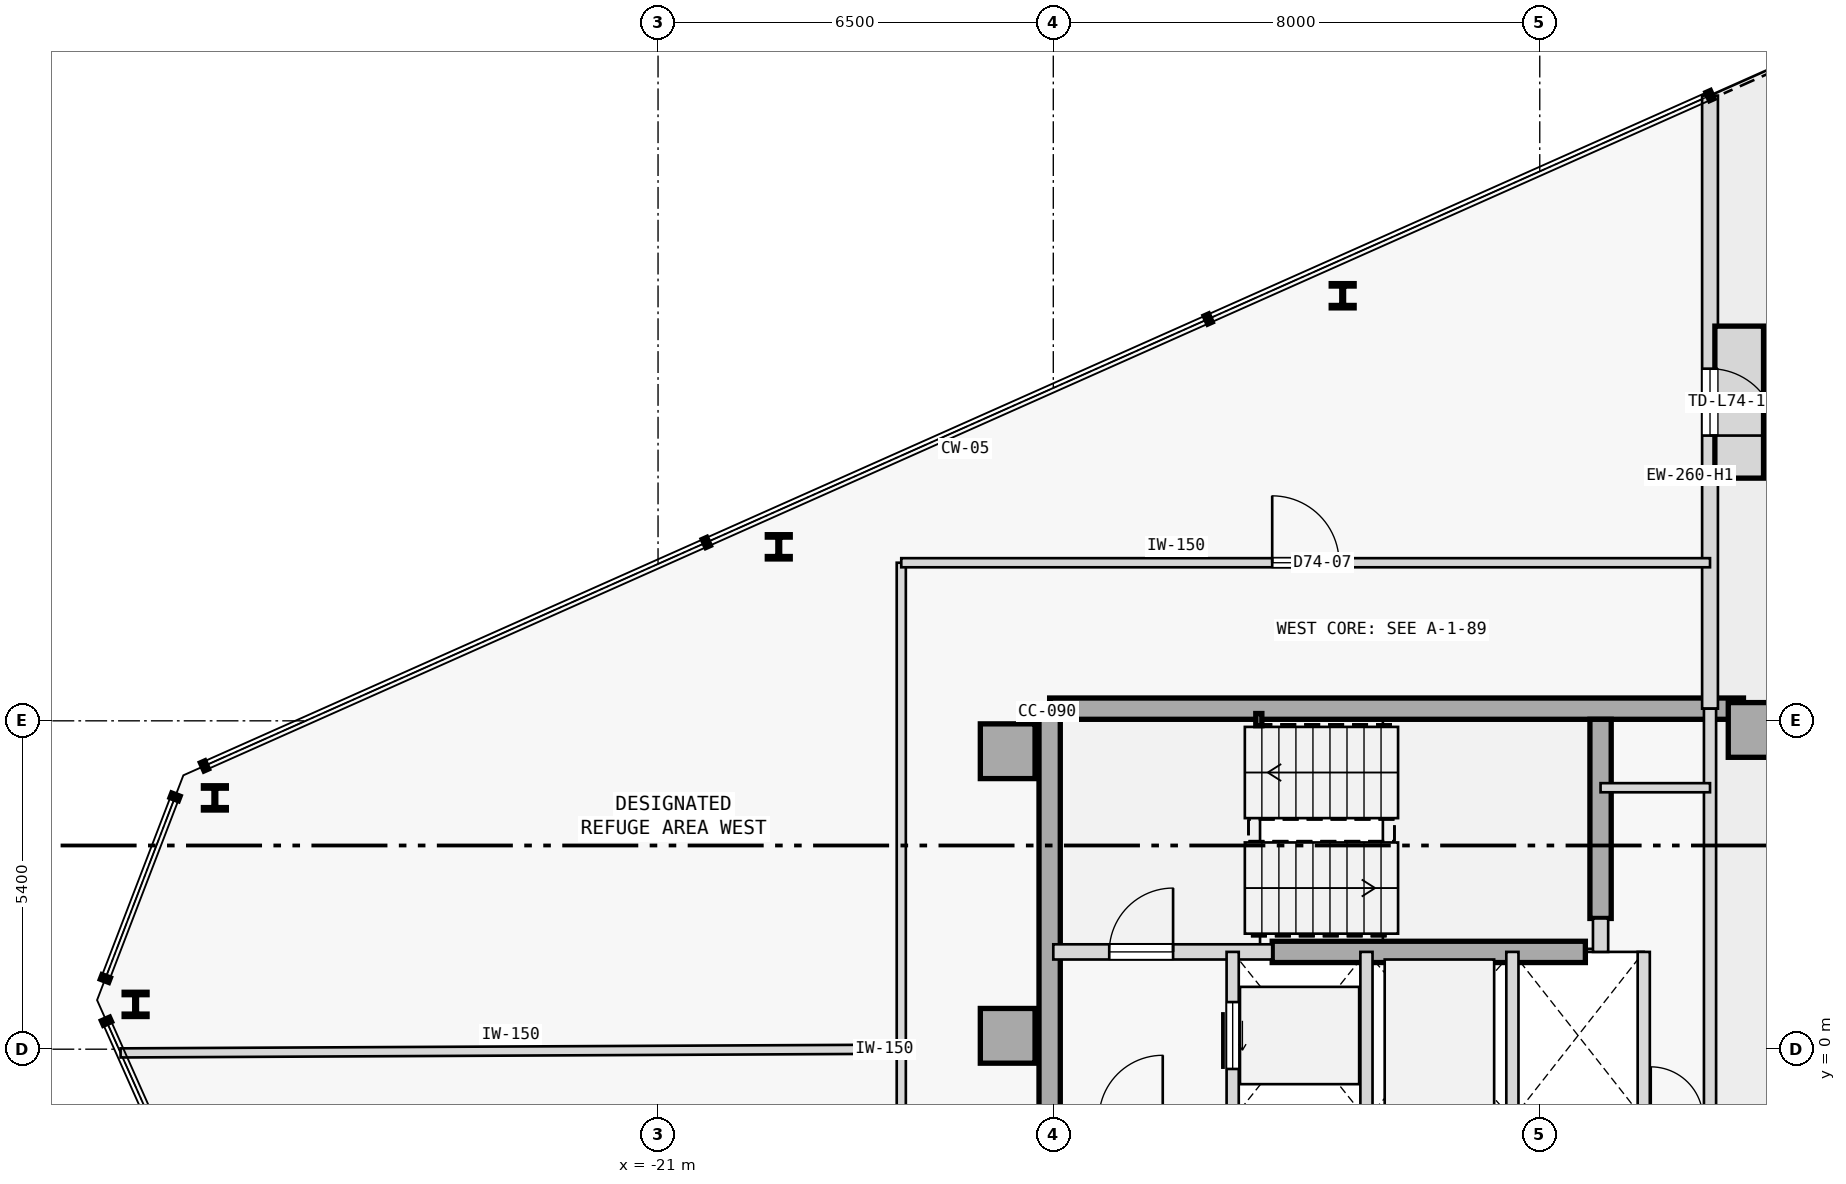
"""IFC4 building model, lengths in metres.
Left out: names, types, materials, properties, quantities, classifications, styles, units other than length and angle.
Written with IfcOpenShell. Run it as: python <this file> out.ifc"""

import sys

from ifc_helpers import new_model, si_unit, direction, frame, frame_2d, origin, origin_2d, place, context, subcontext, project, spatial, rectangle, hollow_rectangle, i_section, extrude, element, fill, save


model = new_model("IFC4")
c1 = context("Model", 3, precision=1e-05, world=origin(), true_north=direction((0.0, 1.0)))
c2 = subcontext(c1, "Body", "Model", "MODEL_VIEW")
j1 = project(units=[si_unit("LENGTHUNIT", "METRE"), si_unit("PLANEANGLEUNIT", "RADIAN")], contexts=[c1])
p1 = place(None, origin())
s1 = spatial("IfcSite", under=j1, at=p1, CompositionType="ELEMENT")
p2 = place(p1, origin())
s2 = spatial("IfcBuilding", under=s1, at=p2, CompositionType="ELEMENT")
p3 = place(p2, frame((0.0, 0.0, 275.6)))
s3 = spatial("IfcBuildingStorey", under=s2, at=p3, CompositionType="ELEMENT", Elevation=275.6)
for number, where, z_axis, x_axis in (
    (1, (-15.25, 4.9, 0.0), (0.0, 0.0, 1.0), (1.0, 0.0, 0.0)),
    (2, (-15.25, 0.22, 0.0), (0.0, 0.0, 1.0), (1.0, 0.0, 0.0)),
    (3, (-2.95, 5.25, 0.0), (0.0, 0.0, 1.0), (1.0, 0.0, 0.0)),
):
    element("IfcColumn", number, at=place(p3, frame(where, z_axis=z_axis, x_axis=x_axis)), inside=s3, PredefinedType="COLUMN", context=c2, shape_type="SweptSolid", body=[
        extrude(rectangle(XDim=0.9, YDim=0.9, at=origin_2d()), origin(), (0.0, 0.0, 1.0), 6.3),
    ])
p4 = place(p3, frame((-14.56, 5.6, 0.0), z_axis=(0.0, 0.0, 1.0), x_axis=(1.0, 0.0, 0.0)))
e4 = element("IfcWall", 4, at=p4, inside=s3, PredefinedType="SHEAR", context=c2, shape_type="SweptSolid", body=[
    extrude(rectangle(XDim=11.41, YDim=0.35, at=frame_2d((5.705, 0.0))), origin(), (0.0, 0.0, 1.0), 6.075),
])
p5 = place(p3, frame((-14.56, -5.425, 0.0), z_axis=(0.0, 0.0, 1.0), x_axis=(0.0, 1.0, 0.0)))
e5 = element("IfcWall", 5, at=p5, inside=s3, PredefinedType="SHEAR", context=c2, shape_type="SweptSolid", body=[
    extrude(rectangle(XDim=10.85, YDim=0.35, at=frame_2d((5.425, 0.0))), origin(), (0.0, 0.0, 1.0), 6.075),
])
p6 = place(p5, frame((2.825, 0.0, 0.0)))
e6 = element("IfcOpeningElement", 6, at=p6, cuts=e5, PredefinedType="OPENING", context=c2, shape_type="SweptSolid", body=[
    extrude(rectangle(XDim=1.05, YDim=2.15, at=frame_2d((0.525, 1.075))), frame((0.0, 0.185, 0.0), z_axis=(0.0, -1.0, 0.0), x_axis=(1.0, 0.0, 0.0)), (0.0, 0.0, 1.0), 0.37),
])
p7 = place(p3, frame((-5.5, 2.15, 0.0), z_axis=(0.0, 0.0, 1.0), x_axis=(0.0, 1.0, 0.0)))
e7 = element("IfcWall", 7, at=p7, inside=s3, PredefinedType="SHEAR", context=c2, shape_type="SweptSolid", body=[
    extrude(rectangle(XDim=3.275, YDim=0.35, at=frame_2d((1.638, 0.0))), origin(), (0.0, 0.0, 1.0), 6.075),
])
p8 = place(p3, frame((-10.9, 1.6, 0.0), z_axis=(0.0, 0.0, 1.0), x_axis=(1.0, 0.0, 0.0)))
e8 = element("IfcWall", 8, at=p8, inside=s3, PredefinedType="SHEAR", context=c2, shape_type="SweptSolid", body=[
    extrude(rectangle(XDim=5.15, YDim=0.35, at=frame_2d((2.575, 0.0))), origin(), (0.0, 0.0, 1.0), 6.075),
])
p9 = place(p3, frame((-11.12, 5.42, 0.0), z_axis=(0.0, 0.0, 1.0), x_axis=(1.0, 0.0, 0.0)))
e9 = element("IfcColumn", 9, at=p9, inside=s3, PredefinedType="COLUMN", context=c2, shape_type="SweptSolid", body=[
    extrude(hollow_rectangle(XDim=0.1, YDim=0.2, WallThickness=0.008, at=origin_2d()), origin(), (0.0, 0.0, 1.0), 6.3),
])
for number, where, z_axis, x_axis in (
    (10, (-9.741, 12.39, 0.0), (0.0, 0.0, 1.0), (1.0, 0.0, 0.0)),
    (11, (-19.015, 8.262, 0.0), (0.0, 0.0, 1.0), (1.0, 0.0, 0.0)),
    (12, (-28.288, 4.133, 0.0), (0.0, 0.0, 1.0), (1.0, 0.0, 0.0)),
    (13, (-29.592, 0.737, 0.0), (0.0, 0.0, 1.0), (1.0, 0.0, 0.0)),
):
    element("IfcColumn", number, at=place(p3, frame(where, z_axis=z_axis, x_axis=x_axis)), inside=s3, PredefinedType="COLUMN", context=c2, shape_type="SweptSolid", body=[
        extrude(i_section(OverallWidth=0.377, OverallDepth=0.399, WebThickness=0.025, FlangeThickness=0.04, FilletRadius=0.015, at=origin_2d()), origin(), (0.0, 0.0, 1.0), 6.3),
    ])
p10 = place(p3, frame((-3.7, 5.6, 0.0), z_axis=(0.0, 0.0, 1.0), x_axis=(0.0, 1.0, 0.0)))
e14 = element("IfcWall", 14, at=p10, inside=s3, PredefinedType="STANDARD", context=c2, shape_type="SweptSolid", body=[
    extrude(rectangle(XDim=10.082, YDim=0.26, at=frame_2d((5.041, 0.0))), origin(), (0.0, 0.0, 1.0), 5.625),
])
p11 = place(p10, frame((4.491, 0.0, 0.0)))
e15 = element("IfcOpeningElement", 15, at=p11, cuts=e14, PredefinedType="OPENING", context=c2, shape_type="SweptSolid", body=[
    extrude(rectangle(XDim=1.1, YDim=2.2, at=frame_2d((0.55, 1.1))), frame((0.0, 0.14, 0.0), z_axis=(0.0, -1.0, 0.0), x_axis=(1.0, 0.0, 0.0)), (0.0, 0.0, 1.0), 0.28),
])
p12 = place(p3, frame((-14.5, 1.6, 0.0), z_axis=(0.0, 0.0, 1.0), x_axis=(1.0, 0.0, 0.0)))
e16 = element("IfcWall", 16, at=p12, inside=s3, PredefinedType="STANDARD", context=c2, shape_type="SweptSolid", body=[
    extrude(rectangle(XDim=3.6, YDim=0.25, at=frame_2d((1.8, 0.0))), origin(), (0.0, 0.0, 1.0), 6.075),
])
p13 = place(p12, frame((0.92, 0.0, 0.0)))
e17 = element("IfcOpeningElement", 17, at=p13, cuts=e16, PredefinedType="OPENING", context=c2, shape_type="SweptSolid", body=[
    extrude(rectangle(XDim=1.05, YDim=2.15, at=frame_2d((0.525, 1.075))), frame((0.0, 0.135, 0.0), z_axis=(0.0, -1.0, 0.0), x_axis=(1.0, 0.0, 0.0)), (0.0, 0.0, 1.0), 0.27),
])
p14 = place(p3, frame((-5.5, 1.6, 0.0), z_axis=(0.0, 0.0, 1.0), x_axis=(0.0, 1.0, 0.0)))
e18 = element("IfcWall", 18, at=p14, inside=s3, PredefinedType="STANDARD", context=c2, shape_type="SweptSolid", body=[
    extrude(rectangle(XDim=0.55, YDim=0.25, at=frame_2d((0.275, 0.0))), origin(), (0.0, 0.0, 1.0), 6.075),
])
p15 = place(p3, frame((-3.7, -1.15, 0.0), z_axis=(0.0, 0.0, 1.0), x_axis=(0.0, 1.0, 0.0)))
e19 = element("IfcWall", 19, at=p15, inside=s3, PredefinedType="STANDARD", context=c2, shape_type="SweptSolid", body=[
    extrude(rectangle(XDim=6.75, YDim=0.2, at=frame_2d((3.375, 0.0))), origin(), (0.0, 0.0, 1.0), 6.075),
])
p16 = place(p3, frame((-11.55, -1.15, 0.0), z_axis=(0.0, 0.0, 1.0), x_axis=(0.0, 1.0, 0.0)))
e20 = element("IfcWall", 20, at=p16, inside=s3, PredefinedType="STANDARD", context=c2, shape_type="SweptSolid", body=[
    extrude(rectangle(XDim=2.75, YDim=0.2, at=frame_2d((1.375, 0.0))), origin(), (0.0, 0.0, 1.0), 6.075),
])
p17 = place(p16, frame((0.825, 0.0, 0.0)))
e21 = element("IfcOpeningElement", 21, at=p17, cuts=e20, PredefinedType="OPENING", context=c2, shape_type="SweptSolid", body=[
    extrude(rectangle(XDim=1.1, YDim=2.15, at=frame_2d((0.55, 1.075))), frame((0.0, 0.11, 0.0), z_axis=(0.0, -1.0, 0.0), x_axis=(1.0, 0.0, 0.0)), (0.0, 0.0, 1.0), 0.22),
])
for number, where, z_axis, x_axis in (
    (22, (-9.35, -1.15, 0.0), (0.0, 0.0, 1.0), (0.0, 1.0, 0.0)),
    (23, (-6.95, -1.15, 0.0), (0.0, 0.0, 1.0), (0.0, 1.0, 0.0)),
    (24, (-4.79, -1.15, 0.0), (0.0, 0.0, 1.0), (0.0, 1.0, 0.0)),
):
    element("IfcWall", number, at=place(p3, frame(where, z_axis=z_axis, x_axis=x_axis)), inside=s3, PredefinedType="STANDARD", context=c2, shape_type="SweptSolid", body=[
        extrude(rectangle(XDim=2.75, YDim=0.2, at=frame_2d((1.375, 0.0))), origin(), (0.0, 0.0, 1.0), 6.075),
    ])
p18 = place(p3, frame((-5.5, 4.3, 0.0), z_axis=(0.0, 0.0, 1.0), x_axis=(1.0, 0.0, 0.0)))
e25 = element("IfcWall", 25, at=p18, inside=s3, PredefinedType="PARTITIONING", context=c2, shape_type="SweptSolid", body=[
    extrude(rectangle(XDim=1.8, YDim=0.15, at=frame_2d((0.9, 0.0))), origin(), (0.0, 0.0, 1.0), 6.075),
])
p19 = place(p3, frame((-17.0, 0.0, 0.0), z_axis=(0.0, 0.0, 1.0), x_axis=(0.0, 1.0, 0.0)))
e26 = element("IfcWall", 26, at=p19, inside=s3, PredefinedType="PARTITIONING", context=c2, shape_type="SweptSolid", body=[
    extrude(rectangle(XDim=8.0, YDim=0.15, at=frame_2d((4.0, 0.0))), origin(), (0.0, 0.0, 1.0), 6.075),
])
p20 = place(p3, frame((-17.0, 8.0, 0.0), z_axis=(0.0, 0.0, 1.0), x_axis=(1.0, 0.0, 0.0)))
e27 = element("IfcWall", 27, at=p20, inside=s3, PredefinedType="PARTITIONING", context=c2, shape_type="SweptSolid", body=[
    extrude(rectangle(XDim=13.3, YDim=0.15, at=frame_2d((6.65, 0.0))), origin(), (0.0, 0.0, 1.0), 6.075),
])
p21 = place(p20, frame((6.1, 0.0, 0.0)))
e28 = element("IfcOpeningElement", 28, at=p21, cuts=e27, PredefinedType="OPENING", context=c2, shape_type="SweptSolid", body=[
    extrude(rectangle(XDim=1.1, YDim=2.15, at=frame_2d((0.55, 1.075))), frame((0.0, 0.085, 0.0), z_axis=(0.0, -1.0, 0.0), x_axis=(1.0, 0.0, 0.0)), (0.0, 0.0, 1.0), 0.17),
])
p22 = place(p3, frame((-17.0, -8.0, 0.0), z_axis=(0.0, 0.0, 1.0), x_axis=(0.0, 1.0, 0.0)))
e29 = element("IfcWall", 29, at=p22, inside=s3, PredefinedType="PARTITIONING", context=c2, shape_type="SweptSolid", body=[
    extrude(rectangle(XDim=8.0, YDim=0.15, at=frame_2d((4.0, 0.0))), origin(), (0.0, 0.0, 1.0), 6.075),
])
p23 = place(p3, frame((-29.838, -0.061, 0.0), z_axis=(0.0, 0.0, 1.0), x_axis=(0.999988608793, 0.004773079162, 0.0)))
e30 = element("IfcWall", 30, at=p23, inside=s3, PredefinedType="PARTITIONING", context=c2, shape_type="SweptSolid", body=[
    extrude(rectangle(XDim=12.839, YDim=0.15, at=frame_2d((6.419, 0.0))), origin(), (0.0, 0.0, 1.0), 6.075),
])
p24 = place(p11, frame((1.1, 0.0, 0.0), z_axis=(0.0, 0.0, 1.0), x_axis=(-1.0, 0.0, 0.0)))
e31 = element("IfcDoor", 31, at=p24, inside=s3, OperationType="SINGLE_SWING_LEFT", PredefinedType="DOOR", context=c2, shape_type="SweptSolid", body=[
    extrude(rectangle(XDim=1.1, YDim=2.2, at=frame_2d((0.55, 1.1))), frame((0.0, 0.025, 0.0), z_axis=(0.0, -1.0, 0.0), x_axis=(1.0, 0.0, 0.0)), (0.0, 0.0, 1.0), 0.05),
])
fill(e15, e31)
p25 = place(p13, origin())
e32 = element("IfcDoor", 32, at=p25, inside=s3, OperationType="SINGLE_SWING_RIGHT", PredefinedType="DOOR", context=c2, shape_type="SweptSolid", body=[
    extrude(rectangle(XDim=1.05, YDim=2.15, at=frame_2d((0.525, 1.075))), frame((0.0, 0.025, 0.0), z_axis=(0.0, -1.0, 0.0), x_axis=(1.0, 0.0, 0.0)), (0.0, 0.0, 1.0), 0.05),
])
fill(e17, e32)
p26 = place(p17, origin())
e33 = element("IfcDoor", 33, at=p26, inside=s3, OperationType="SLIDING_TO_RIGHT", PredefinedType="DOOR", context=c2, shape_type="SweptSolid", body=[
    extrude(rectangle(XDim=1.1, YDim=2.15, at=frame_2d((0.55, 1.075))), frame((0.0, 0.025, 0.0), z_axis=(0.0, -1.0, 0.0), x_axis=(1.0, 0.0, 0.0)), (0.0, 0.0, 1.0), 0.05),
])
fill(e21, e33)
p27 = place(p21, origin())
e34 = element("IfcDoor", 34, at=p27, inside=s3, OperationType="SINGLE_SWING_LEFT", PredefinedType="DOOR", context=c2, shape_type="SweptSolid", body=[
    extrude(rectangle(XDim=1.1, YDim=2.15, at=frame_2d((0.55, 1.075))), frame((0.0, 0.025, 0.0), z_axis=(0.0, -1.0, 0.0), x_axis=(1.0, 0.0, 0.0)), (0.0, 0.0, 1.0), 0.05),
])
fill(e28, e34)
save(model, sys.argv[1])
